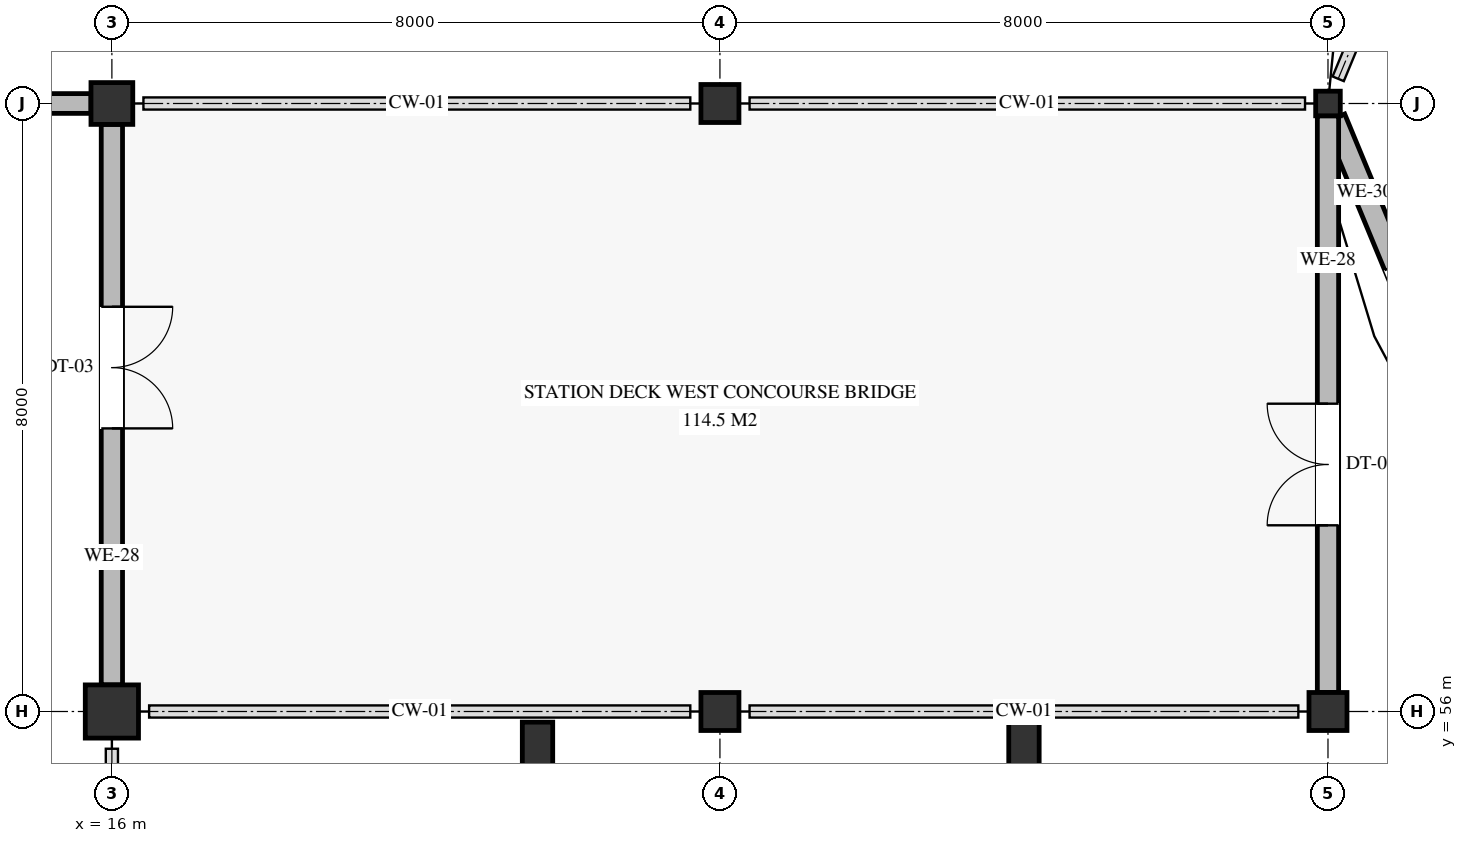
"""IFC4 building model, lengths in metres.
Left out: names, types, materials, properties, quantities, classifications, styles, units other than length and angle.
Written with IfcOpenShell. Run it as: python <this file> out.ifc"""

import sys

from ifc_helpers import new_model, si_unit, direction, frame, frame_2d, origin, origin_2d, place, context, subcontext, project, spatial, rectangle, hollow_circle, extrude, element, fill, save


model = new_model("IFC4")
c1 = context("Model", 3, precision=1e-05, world=origin(), true_north=direction((0.0, 1.0)))
c2 = subcontext(c1, "Body", "Model", "MODEL_VIEW")
j1 = project(units=[si_unit("LENGTHUNIT", "METRE"), si_unit("PLANEANGLEUNIT", "RADIAN")], contexts=[c1])
p1 = place(None, origin())
s1 = spatial("IfcSite", under=j1, at=p1, CompositionType="ELEMENT")
p2 = place(p1, origin())
s2 = spatial("IfcBuilding", under=s1, at=p2, CompositionType="ELEMENT")
p3 = place(p2, frame((0.0, 0.0, 9.6)))
s3 = spatial("IfcBuildingStorey", under=s2, at=p3, CompositionType="ELEMENT", Elevation=9.6)
p4 = place(p3, frame((32.0, 64.0, 0.0), z_axis=(0.0, 0.0, 1.0), x_axis=(1.0, 0.0, 0.0)))
e1 = element("IfcColumn", 1, at=p4, inside=s3, PredefinedType="COLUMN", context=c2, shape_type="SweptSolid", body=[
    extrude(hollow_circle(Radius=0.162, WallThickness=0.016, at=origin_2d()), origin(), (0.0, 0.0, 1.0), 5.4),
])
p5 = place(p3, frame((16.0, 56.0, 0.0), z_axis=(0.0, 0.0, 1.0), x_axis=(1.0, 0.0, 0.0)))
e2 = element("IfcColumn", 2, at=p5, inside=s3, PredefinedType="COLUMN", context=c2, shape_type="SweptSolid", body=[
    extrude(rectangle(XDim=0.7, YDim=0.7, at=origin_2d()), origin(), (0.0, 0.0, 1.0), 5.4),
])
p6 = place(p3, frame((16.0, 64.0, 0.0), z_axis=(0.0, 0.0, 1.0), x_axis=(1.0, 0.0, 0.0)))
e3 = element("IfcColumn", 3, at=p6, inside=s3, PredefinedType="COLUMN", context=c2, shape_type="SweptSolid", body=[
    extrude(rectangle(XDim=0.55, YDim=0.55, at=origin_2d()), origin(), (0.0, 0.0, 1.0), 5.4),
])
for number, where, z_axis, x_axis in (
    (4, (24.0, 56.0, 0.0), (0.0, 0.0, 1.0), (1.0, 0.0, 0.0)),
    (5, (24.0, 64.0, 0.0), (0.0, 0.0, 1.0), (1.0, 0.0, 0.0)),
    (6, (32.0, 56.0, 0.0), (0.0, 0.0, 1.0), (1.0, 0.0, 0.0)),
):
    element("IfcColumn", number, at=place(p3, frame(where, z_axis=z_axis, x_axis=x_axis)), inside=s3, PredefinedType="COLUMN", context=c2, shape_type="SweptSolid", body=[
        extrude(rectangle(XDim=0.5, YDim=0.5, at=origin_2d()), origin(), (0.0, 0.0, 1.0), 5.4),
    ])
for number, where, z_axis, x_axis in (
    (7, (21.6, 55.56, 0.0), (0.0, 0.0, 1.0), (1.0, 0.0, 0.0)),
    (8, (28.0, 55.56, 0.0), (0.0, 0.0, 1.0), (1.0, 0.0, 0.0)),
):
    element("IfcColumn", number, at=place(p3, frame(where, z_axis=z_axis, x_axis=x_axis)), inside=s3, PredefinedType="PILASTER", context=c2, shape_type="SweptSolid", body=[
        extrude(rectangle(XDim=0.4, YDim=0.6, at=origin_2d()), origin(), (0.0, 0.0, 1.0), 5.4),
    ])
p7 = place(p3, frame((34.262, 58.539, 0.0), z_axis=(0.0, 0.0, 1.0), x_axis=(-0.382677131927, 0.923882142213, 0.0)))
e9 = element("IfcWall", 9, at=p7, inside=s3, PredefinedType="STANDARD", context=c2, shape_type="SweptSolid", body=[
    extrude(rectangle(XDim=5.7, YDim=0.3, at=frame_2d((2.85, 0.0))), origin(), (0.0, 0.0, 1.0), 4.478),
])
p8 = place(p7, frame((1.2, 0.0, 0.0)))
e10 = element("IfcOpeningElement", 10, at=p8, cuts=e9, PredefinedType="OPENING", context=c2, shape_type="SweptSolid", body=[
    extrude(rectangle(XDim=2.4, YDim=2.2, at=frame_2d((1.2, 1.1))), frame((0.0, 0.16, 0.0), z_axis=(0.0, -1.0, 0.0), x_axis=(1.0, 0.0, 0.0)), (0.0, 0.0, 1.0), 0.32),
])
p9 = place(p3, frame((16.0, 63.725, 0.0), z_axis=(0.0, 0.0, 1.0), x_axis=(0.0, -1.0, 0.0)))
e11 = element("IfcWall", 11, at=p9, inside=s3, PredefinedType="STANDARD", context=c2, shape_type="SweptSolid", body=[
    extrude(rectangle(XDim=7.375, YDim=0.28, at=frame_2d((3.688, 0.0))), origin(), (0.0, 0.0, 1.0), 5.1),
])
p10 = place(p9, frame((2.4, 0.0, 0.0)))
e12 = element("IfcOpeningElement", 12, at=p10, cuts=e11, PredefinedType="OPENING", context=c2, shape_type="SweptSolid", body=[
    extrude(rectangle(XDim=1.6, YDim=2.4, at=frame_2d((0.8, 1.2))), frame((0.0, 0.15, 0.0), z_axis=(0.0, -1.0, 0.0), x_axis=(1.0, 0.0, 0.0)), (0.0, 0.0, 1.0), 0.3),
])
p11 = place(p3, frame((0.275, 64.0, 0.0), z_axis=(0.0, 0.0, 1.0), x_axis=(1.0, 0.0, 0.0)))
e13 = element("IfcWall", 13, at=p11, inside=s3, PredefinedType="STANDARD", context=c2, shape_type="SweptSolid", body=[
    extrude(rectangle(XDim=15.45, YDim=0.26, at=frame_2d((7.725, 0.0))), origin(), (0.0, 0.0, 1.0), 4.38),
])
p12 = place(p11, frame((6.95, 0.0, 0.75)))
e14 = element("IfcOpeningElement", 14, at=p12, cuts=e13, PredefinedType="OPENING", context=c2, shape_type="SweptSolid", body=[
    extrude(rectangle(XDim=1.55, YDim=2.35, at=frame_2d((0.775, 1.175))), frame((0.0, 0.14, 0.0), z_axis=(0.0, -1.0, 0.0), x_axis=(1.0, 0.0, 0.0)), (0.0, 0.0, 1.0), 0.28),
])
p13 = place(p3, frame((32.0, 56.25, 0.0), z_axis=(0.0, 0.0, 1.0), x_axis=(0.0, 1.0, 0.0)))
e15 = element("IfcWall", 15, at=p13, inside=s3, PredefinedType="STANDARD", context=c2, shape_type="SweptSolid", body=[
    extrude(rectangle(XDim=7.588, YDim=0.28, at=frame_2d((3.794, 0.0))), origin(), (0.0, 0.0, 1.0), 4.478),
])
p14 = place(p13, frame((2.2, 0.0, 0.0)))
e16 = element("IfcOpeningElement", 16, at=p14, cuts=e15, PredefinedType="OPENING", context=c2, shape_type="SweptSolid", body=[
    extrude(rectangle(XDim=1.6, YDim=2.4, at=frame_2d((0.8, 1.2))), frame((0.0, 0.15, 0.0), z_axis=(0.0, -1.0, 0.0), x_axis=(1.0, 0.0, 0.0)), (0.0, 0.0, 1.0), 0.3),
])
p15 = place(p10, origin())
e17 = element("IfcDoor", 17, at=p15, inside=s3, OperationType="DOUBLE_DOOR_SINGLE_SWING", PredefinedType="DOOR", context=c2, shape_type="SweptSolid", body=[
    extrude(rectangle(XDim=1.6, YDim=2.4, at=frame_2d((0.8, 1.2))), frame((0.0, 0.025, 0.0), z_axis=(0.0, -1.0, 0.0), x_axis=(1.0, 0.0, 0.0)), (0.0, 0.0, 1.0), 0.05),
])
fill(e12, e17)
p16 = place(p14, origin())
e18 = element("IfcDoor", 18, at=p16, inside=s3, OperationType="DOUBLE_DOOR_SINGLE_SWING", PredefinedType="DOOR", context=c2, shape_type="SweptSolid", body=[
    extrude(rectangle(XDim=1.6, YDim=2.4, at=frame_2d((0.8, 1.2))), frame((0.0, 0.025, 0.0), z_axis=(0.0, -1.0, 0.0), x_axis=(1.0, 0.0, 0.0)), (0.0, 0.0, 1.0), 0.05),
])
fill(e16, e18)
save(model, sys.argv[1])
